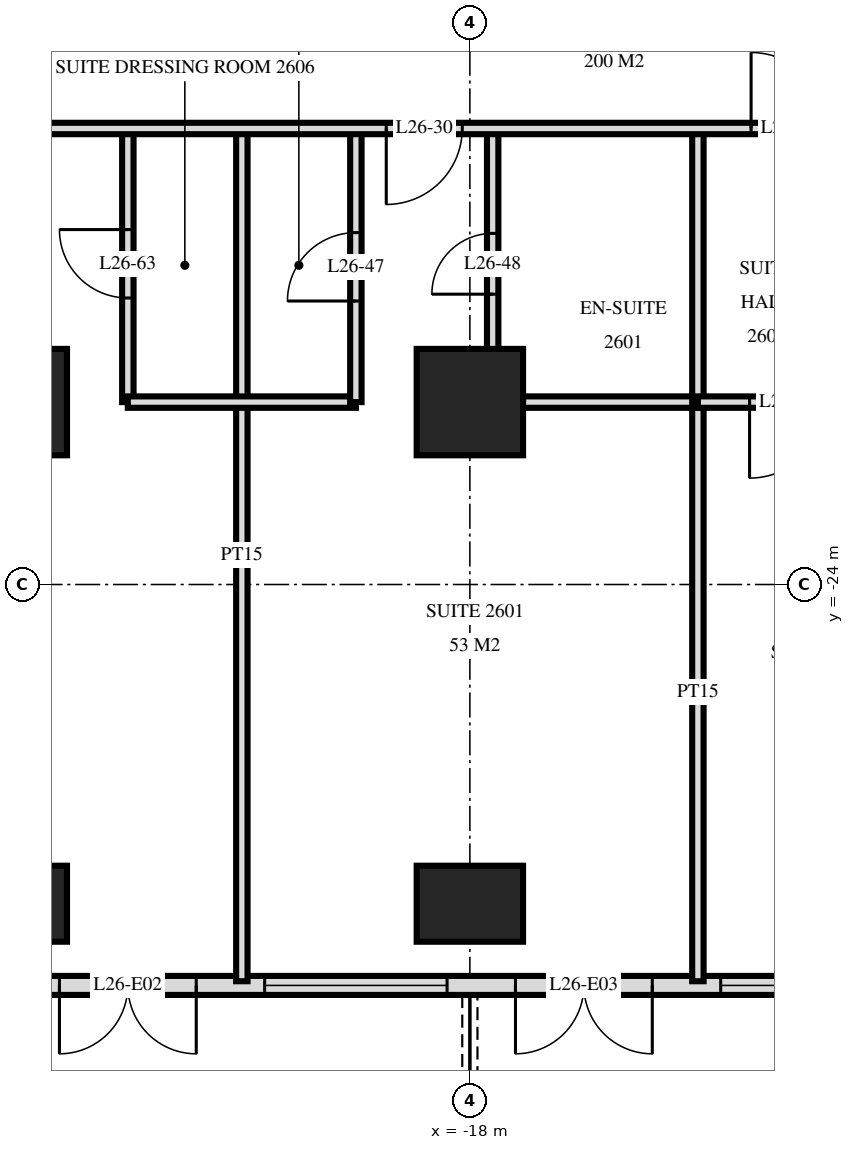
"""IFC4 building model, lengths in metres.
Left out: names, types, materials, properties, quantities, classifications, styles, units other than length and angle.
Written with IfcOpenShell. Run it as: python <this file> out.ifc"""

import sys

from ifc_helpers import new_model, si_unit, direction, frame, frame_2d, origin, origin_2d, place, context, subcontext, project, spatial, rectangle, extrude, element, fill, save


model = new_model("IFC4")
c1 = context("Model", 3, precision=1e-05, world=origin(), true_north=direction((0.0, 1.0)))
c2 = subcontext(c1, "Body", "Model", "MODEL_VIEW")
j1 = project(units=[si_unit("LENGTHUNIT", "METRE"), si_unit("PLANEANGLEUNIT", "RADIAN")], contexts=[c1])
p1 = place(None, origin())
s1 = spatial("IfcSite", under=j1, at=p1, CompositionType="ELEMENT")
p2 = place(p1, origin())
s2 = spatial("IfcBuilding", under=s1, at=p2, CompositionType="ELEMENT")
p3 = place(p2, frame((0.0, 0.0, 103.2)))
s3 = spatial("IfcBuildingStorey", under=s2, at=p3, CompositionType="ELEMENT", Elevation=103.2)
p4 = place(p3, frame((-24.0, -28.2, 0.0), z_axis=(0.0, 0.0, 1.0), x_axis=(1.0, 0.0, 0.0)))
e1 = element("IfcColumn", 1, at=p4, inside=s3, PredefinedType="COLUMN", context=c2, shape_type="SweptSolid", body=[
    extrude(rectangle(XDim=1.4, YDim=1.0, at=origin_2d()), origin(), (0.0, 0.0, 1.0), 3.6),
])
p5 = place(p3, frame((-24.0, -21.6, 0.0), z_axis=(0.0, 0.0, 1.0), x_axis=(1.0, 0.0, 0.0)))
e2 = element("IfcColumn", 2, at=p5, inside=s3, PredefinedType="COLUMN", context=c2, shape_type="SweptSolid", body=[
    extrude(rectangle(XDim=1.4, YDim=1.4, at=origin_2d()), origin(), (0.0, 0.0, 1.0), 3.6),
])
p6 = place(p3, frame((-18.0, -28.2, 0.0), z_axis=(0.0, 0.0, 1.0), x_axis=(1.0, 0.0, 0.0)))
e3 = element("IfcColumn", 3, at=p6, inside=s3, PredefinedType="COLUMN", context=c2, shape_type="SweptSolid", body=[
    extrude(rectangle(XDim=1.4, YDim=1.0, at=origin_2d()), origin(), (0.0, 0.0, 1.0), 3.6),
])
p7 = place(p3, frame((-18.0, -21.6, 0.0), z_axis=(0.0, 0.0, 1.0), x_axis=(1.0, 0.0, 0.0)))
e4 = element("IfcColumn", 4, at=p7, inside=s3, PredefinedType="COLUMN", context=c2, shape_type="SweptSolid", body=[
    extrude(rectangle(XDim=1.4, YDim=1.4, at=origin_2d()), origin(), (0.0, 0.0, 1.0), 3.6),
])
p8 = place(p3, frame((-28.775, -29.275, 0.0), z_axis=(0.0, 0.0, 1.0), x_axis=(1.0, 0.0, 0.0)))
e5 = element("IfcWall", 5, at=p8, inside=s3, PredefinedType="SOLIDWALL", context=c2, shape_type="SweptSolid", body=[
    extrude(rectangle(XDim=57.551, YDim=0.25, at=frame_2d((28.775, 0.0))), origin(), (0.0, 0.0, 1.0), 3.3),
])
p9 = place(p8, frame((0.575, 0.0, 0.0)))
e6 = element("IfcOpeningElement", 6, at=p9, cuts=e5, PredefinedType="OPENING", context=c2, shape_type="SweptSolid", body=[
    extrude(rectangle(XDim=1.8, YDim=2.4, at=frame_2d((0.9, 1.2))), frame((0.0, 0.135, 0.0), z_axis=(0.0, -1.0, 0.0), x_axis=(1.0, 0.0, 0.0)), (0.0, 0.0, 1.0), 0.27),
])
p10 = place(p8, frame((5.375, 0.0, 0.0)))
e7 = element("IfcOpeningElement", 7, at=p10, cuts=e5, PredefinedType="OPENING", context=c2, shape_type="SweptSolid", body=[
    extrude(rectangle(XDim=1.8, YDim=2.4, at=frame_2d((0.9, 1.2))), frame((0.0, 0.135, 0.0), z_axis=(0.0, -1.0, 0.0), x_axis=(1.0, 0.0, 0.0)), (0.0, 0.0, 1.0), 0.27),
])
p11 = place(p8, frame((8.075, 0.0, 0.3)))
e8 = element("IfcOpeningElement", 8, at=p11, cuts=e5, PredefinedType="OPENING", context=c2, shape_type="SweptSolid", body=[
    extrude(rectangle(XDim=2.4, YDim=2.1, at=frame_2d((1.2, 1.05))), frame((0.0, 0.135, 0.0), z_axis=(0.0, -1.0, 0.0), x_axis=(1.0, 0.0, 0.0)), (0.0, 0.0, 1.0), 0.27),
])
p12 = place(p8, frame((11.375, 0.0, 0.0)))
e9 = element("IfcOpeningElement", 9, at=p12, cuts=e5, PredefinedType="OPENING", context=c2, shape_type="SweptSolid", body=[
    extrude(rectangle(XDim=1.8, YDim=2.4, at=frame_2d((0.9, 1.2))), frame((0.0, 0.135, 0.0), z_axis=(0.0, -1.0, 0.0), x_axis=(1.0, 0.0, 0.0)), (0.0, 0.0, 1.0), 0.27),
])
p13 = place(p8, frame((14.075, 0.0, 0.3)))
e10 = element("IfcOpeningElement", 10, at=p13, cuts=e5, PredefinedType="OPENING", context=c2, shape_type="SweptSolid", body=[
    extrude(rectangle(XDim=2.4, YDim=2.1, at=frame_2d((1.2, 1.05))), frame((0.0, 0.135, 0.0), z_axis=(0.0, -1.0, 0.0), x_axis=(1.0, 0.0, 0.0)), (0.0, 0.0, 1.0), 0.27),
])
p14 = place(p8, frame((17.375, 0.0, 0.0)))
e11 = element("IfcOpeningElement", 11, at=p14, cuts=e5, PredefinedType="OPENING", context=c2, shape_type="SweptSolid", body=[
    extrude(rectangle(XDim=1.8, YDim=2.4, at=frame_2d((0.9, 1.2))), frame((0.0, 0.135, 0.0), z_axis=(0.0, -1.0, 0.0), x_axis=(1.0, 0.0, 0.0)), (0.0, 0.0, 1.0), 0.27),
])
p15 = place(p8, frame((20.075, 0.0, 0.3)))
e12 = element("IfcOpeningElement", 12, at=p15, cuts=e5, PredefinedType="OPENING", context=c2, shape_type="SweptSolid", body=[
    extrude(rectangle(XDim=2.4, YDim=2.1, at=frame_2d((1.2, 1.05))), frame((0.0, 0.135, 0.0), z_axis=(0.0, -1.0, 0.0), x_axis=(1.0, 0.0, 0.0)), (0.0, 0.0, 1.0), 0.27),
])
p16 = place(p8, frame((23.075, 0.0, 0.3)))
e13 = element("IfcOpeningElement", 13, at=p16, cuts=e5, PredefinedType="OPENING", context=c2, shape_type="SweptSolid", body=[
    extrude(rectangle(XDim=2.4, YDim=2.1, at=frame_2d((1.2, 1.05))), frame((0.0, 0.135, 0.0), z_axis=(0.0, -1.0, 0.0), x_axis=(1.0, 0.0, 0.0)), (0.0, 0.0, 1.0), 0.27),
])
p17 = place(p8, frame((26.375, 0.0, 0.0)))
e14 = element("IfcOpeningElement", 14, at=p17, cuts=e5, PredefinedType="OPENING", context=c2, shape_type="SweptSolid", body=[
    extrude(rectangle(XDim=1.8, YDim=2.4, at=frame_2d((0.9, 1.2))), frame((0.0, 0.135, 0.0), z_axis=(0.0, -1.0, 0.0), x_axis=(1.0, 0.0, 0.0)), (0.0, 0.0, 1.0), 0.27),
])
p18 = place(p8, frame((29.075, 0.0, 0.3)))
e15 = element("IfcOpeningElement", 15, at=p18, cuts=e5, PredefinedType="OPENING", context=c2, shape_type="SweptSolid", body=[
    extrude(rectangle(XDim=2.4, YDim=2.1, at=frame_2d((1.2, 1.05))), frame((0.0, 0.135, 0.0), z_axis=(0.0, -1.0, 0.0), x_axis=(1.0, 0.0, 0.0)), (0.0, 0.0, 1.0), 0.27),
])
p19 = place(p8, frame((32.375, 0.0, 0.0)))
e16 = element("IfcOpeningElement", 16, at=p19, cuts=e5, PredefinedType="OPENING", context=c2, shape_type="SweptSolid", body=[
    extrude(rectangle(XDim=1.8, YDim=2.4, at=frame_2d((0.9, 1.2))), frame((0.0, 0.135, 0.0), z_axis=(0.0, -1.0, 0.0), x_axis=(1.0, 0.0, 0.0)), (0.0, 0.0, 1.0), 0.27),
])
p20 = place(p8, frame((35.375, 0.0, 0.0)))
e17 = element("IfcOpeningElement", 17, at=p20, cuts=e5, PredefinedType="OPENING", context=c2, shape_type="SweptSolid", body=[
    extrude(rectangle(XDim=1.8, YDim=2.4, at=frame_2d((0.9, 1.2))), frame((0.0, 0.135, 0.0), z_axis=(0.0, -1.0, 0.0), x_axis=(1.0, 0.0, 0.0)), (0.0, 0.0, 1.0), 0.27),
])
p21 = place(p8, frame((38.075, 0.0, 0.3)))
e18 = element("IfcOpeningElement", 18, at=p21, cuts=e5, PredefinedType="OPENING", context=c2, shape_type="SweptSolid", body=[
    extrude(rectangle(XDim=2.4, YDim=2.1, at=frame_2d((1.2, 1.05))), frame((0.0, 0.135, 0.0), z_axis=(0.0, -1.0, 0.0), x_axis=(1.0, 0.0, 0.0)), (0.0, 0.0, 1.0), 0.27),
])
p22 = place(p8, frame((41.375, 0.0, 0.0)))
e19 = element("IfcOpeningElement", 19, at=p22, cuts=e5, PredefinedType="OPENING", context=c2, shape_type="SweptSolid", body=[
    extrude(rectangle(XDim=1.8, YDim=2.4, at=frame_2d((0.9, 1.2))), frame((0.0, 0.135, 0.0), z_axis=(0.0, -1.0, 0.0), x_axis=(1.0, 0.0, 0.0)), (0.0, 0.0, 1.0), 0.27),
])
p23 = place(p8, frame((44.075, 0.0, 0.3)))
e20 = element("IfcOpeningElement", 20, at=p23, cuts=e5, PredefinedType="OPENING", context=c2, shape_type="SweptSolid", body=[
    extrude(rectangle(XDim=2.4, YDim=2.1, at=frame_2d((1.2, 1.05))), frame((0.0, 0.135, 0.0), z_axis=(0.0, -1.0, 0.0), x_axis=(1.0, 0.0, 0.0)), (0.0, 0.0, 1.0), 0.27),
])
p24 = place(p8, frame((47.075, 0.0, 0.3)))
e21 = element("IfcOpeningElement", 21, at=p24, cuts=e5, PredefinedType="OPENING", context=c2, shape_type="SweptSolid", body=[
    extrude(rectangle(XDim=2.4, YDim=2.1, at=frame_2d((1.2, 1.05))), frame((0.0, 0.135, 0.0), z_axis=(0.0, -1.0, 0.0), x_axis=(1.0, 0.0, 0.0)), (0.0, 0.0, 1.0), 0.27),
])
p25 = place(p8, frame((50.375, 0.0, 0.0)))
e22 = element("IfcOpeningElement", 22, at=p25, cuts=e5, PredefinedType="OPENING", context=c2, shape_type="SweptSolid", body=[
    extrude(rectangle(XDim=1.8, YDim=2.4, at=frame_2d((0.9, 1.2))), frame((0.0, 0.135, 0.0), z_axis=(0.0, -1.0, 0.0), x_axis=(1.0, 0.0, 0.0)), (0.0, 0.0, 1.0), 0.27),
])
p26 = place(p8, frame((53.375, 0.0, 0.0)))
e23 = element("IfcOpeningElement", 23, at=p26, cuts=e5, PredefinedType="OPENING", context=c2, shape_type="SweptSolid", body=[
    extrude(rectangle(XDim=1.8, YDim=2.4, at=frame_2d((0.9, 1.2))), frame((0.0, 0.135, 0.0), z_axis=(0.0, -1.0, 0.0), x_axis=(1.0, 0.0, 0.0)), (0.0, 0.0, 1.0), 0.27),
])
p27 = place(p3, frame((-15.0, -21.6, 0.0), z_axis=(0.0, 0.0, 1.0), x_axis=(0.0, 1.0, 0.0)))
e24 = element("IfcWall", 24, at=p27, inside=s3, PredefinedType="PARTITIONING", context=c2, shape_type="SweptSolid", body=[
    extrude(rectangle(XDim=3.6, YDim=0.15, at=frame_2d((1.8, 0.0))), origin(), (0.0, 0.0, 1.0), 3.32),
])
p28 = place(p3, frame((-15.0, -29.22, 0.0), z_axis=(0.0, 0.0, 1.0), x_axis=(0.0, 1.0, 0.0)))
e25 = element("IfcWall", 25, at=p28, inside=s3, PredefinedType="PARTITIONING", context=c2, shape_type="SweptSolid", body=[
    extrude(rectangle(XDim=7.62, YDim=0.15, at=frame_2d((3.81, 0.0))), origin(), (0.0, 0.0, 1.0), 3.32),
])
p29 = place(p3, frame((-17.7, -21.6, 0.0), z_axis=(0.0, 0.0, 1.0), x_axis=(0.0, 1.0, 0.0)))
e26 = element("IfcWall", 26, at=p29, inside=s3, PredefinedType="PARTITIONING", context=c2, shape_type="SweptSolid", body=[
    extrude(rectangle(XDim=3.6, YDim=0.15, at=frame_2d((1.8, 0.0))), origin(), (0.0, 0.0, 1.0), 3.32),
])
p30 = place(p29, frame((1.42, 0.0, 0.0)))
e27 = element("IfcOpeningElement", 27, at=p30, cuts=e26, PredefinedType="OPENING", context=c2, shape_type="SweptSolid", body=[
    extrude(rectangle(XDim=0.8, YDim=2.1, at=frame_2d((0.4, 1.05))), frame((0.0, 0.085, 0.0), z_axis=(0.0, -1.0, 0.0), x_axis=(1.0, 0.0, 0.0)), (0.0, 0.0, 1.0), 0.17),
])
p31 = place(p3, frame((-19.5, -21.6, 0.0), z_axis=(0.0, 0.0, 1.0), x_axis=(0.0, 1.0, 0.0)))
e28 = element("IfcWall", 28, at=p31, inside=s3, PredefinedType="PARTITIONING", context=c2, shape_type="SweptSolid", body=[
    extrude(rectangle(XDim=3.6, YDim=0.15, at=frame_2d((1.8, 0.0))), origin(), (0.0, 0.0, 1.0), 3.32),
])
p32 = place(p31, frame((1.33, 0.0, 0.0)))
e29 = element("IfcOpeningElement", 29, at=p32, cuts=e28, PredefinedType="OPENING", context=c2, shape_type="SweptSolid", body=[
    extrude(rectangle(XDim=0.9, YDim=2.1, at=frame_2d((0.45, 1.05))), frame((0.0, 0.085, 0.0), z_axis=(0.0, -1.0, 0.0), x_axis=(1.0, 0.0, 0.0)), (0.0, 0.0, 1.0), 0.17),
])
p33 = place(p3, frame((-21.0, -29.22, 0.0), z_axis=(0.0, 0.0, 1.0), x_axis=(0.0, 1.0, 0.0)))
e30 = element("IfcWall", 30, at=p33, inside=s3, PredefinedType="PARTITIONING", context=c2, shape_type="SweptSolid", body=[
    extrude(rectangle(XDim=11.22, YDim=0.15, at=frame_2d((5.61, 0.0))), origin(), (0.0, 0.0, 1.0), 3.32),
])
p34 = place(p3, frame((-22.5, -21.6, 0.0), z_axis=(0.0, 0.0, 1.0), x_axis=(0.0, 1.0, 0.0)))
e31 = element("IfcWall", 31, at=p34, inside=s3, PredefinedType="PARTITIONING", context=c2, shape_type="SweptSolid", body=[
    extrude(rectangle(XDim=3.6, YDim=0.15, at=frame_2d((1.8, 0.0))), origin(), (0.0, 0.0, 1.0), 3.32),
])
p35 = place(p34, frame((1.37, 0.0, 0.0)))
e32 = element("IfcOpeningElement", 32, at=p35, cuts=e31, PredefinedType="OPENING", context=c2, shape_type="SweptSolid", body=[
    extrude(rectangle(XDim=0.9, YDim=2.1, at=frame_2d((0.45, 1.05))), frame((0.0, 0.085, 0.0), z_axis=(0.0, -1.0, 0.0), x_axis=(1.0, 0.0, 0.0)), (0.0, 0.0, 1.0), 0.17),
])
p36 = place(p3, frame((-15.0, -21.6, 0.0), z_axis=(0.0, 0.0, 1.0), x_axis=(1.0, 0.0, 0.0)))
e33 = element("IfcWall", 33, at=p36, inside=s3, PredefinedType="PARTITIONING", context=c2, shape_type="SweptSolid", body=[
    extrude(rectangle(XDim=2.4, YDim=0.15, at=frame_2d((1.2, 0.0))), origin(), (0.0, 0.0, 1.0), 3.32),
])
p37 = place(p36, frame((0.68, 0.0, 0.0)))
e34 = element("IfcOpeningElement", 34, at=p37, cuts=e33, PredefinedType="OPENING", context=c2, shape_type="SweptSolid", body=[
    extrude(rectangle(XDim=1.0, YDim=2.1, at=frame_2d((0.5, 1.05))), frame((0.0, 0.085, 0.0), z_axis=(0.0, -1.0, 0.0), x_axis=(1.0, 0.0, 0.0)), (0.0, 0.0, 1.0), 0.17),
])
p38 = place(p3, frame((-22.5, -21.6, 0.0), z_axis=(0.0, 0.0, 1.0), x_axis=(1.0, 0.0, 0.0)))
e35 = element("IfcWall", 35, at=p38, inside=s3, PredefinedType="PARTITIONING", context=c2, shape_type="SweptSolid", body=[
    extrude(rectangle(XDim=3.0, YDim=0.15, at=frame_2d((1.5, 0.0))), origin(), (0.0, 0.0, 1.0), 3.32),
])
p39 = place(p3, frame((-17.7, -21.6, 0.0), z_axis=(0.0, 0.0, 1.0), x_axis=(1.0, 0.0, 0.0)))
e36 = element("IfcWall", 36, at=p39, inside=s3, PredefinedType="PARTITIONING", context=c2, shape_type="SweptSolid", body=[
    extrude(rectangle(XDim=2.7, YDim=0.15, at=frame_2d((1.35, 0.0))), origin(), (0.0, 0.0, 1.0), 3.32),
])
p40 = place(p3, frame((-33.12, -18.0, 0.0), z_axis=(0.0, 0.0, 1.0), x_axis=(1.0, 0.0, 0.0)))
e37 = element("IfcWall", 37, at=p40, inside=s3, PredefinedType="PARTITIONING", context=c2, shape_type="SweptSolid", body=[
    extrude(rectangle(XDim=66.24, YDim=0.15, at=frame_2d((33.12, 0.0))), origin(), (0.0, 0.0, 1.0), 3.32),
])
p41 = place(p40, frame((14.02, 0.0, 0.0)))
e38 = element("IfcOpeningElement", 38, at=p41, cuts=e37, PredefinedType="OPENING", context=c2, shape_type="SweptSolid", body=[
    extrude(rectangle(XDim=1.0, YDim=2.1, at=frame_2d((0.5, 1.05))), frame((0.0, 0.085, 0.0), z_axis=(0.0, -1.0, 0.0), x_axis=(1.0, 0.0, 0.0)), (0.0, 0.0, 1.0), 0.17),
])
p42 = place(p40, frame((18.82, 0.0, 0.0)))
e39 = element("IfcOpeningElement", 39, at=p42, cuts=e37, PredefinedType="OPENING", context=c2, shape_type="SweptSolid", body=[
    extrude(rectangle(XDim=1.0, YDim=2.1, at=frame_2d((0.5, 1.05))), frame((0.0, 0.085, 0.0), z_axis=(0.0, -1.0, 0.0), x_axis=(1.0, 0.0, 0.0)), (0.0, 0.0, 1.0), 0.17),
])
p43 = place(p40, frame((30.27, 0.0, 0.0)))
e40 = element("IfcOpeningElement", 40, at=p43, cuts=e37, PredefinedType="OPENING", context=c2, shape_type="SweptSolid", body=[
    extrude(rectangle(XDim=1.0, YDim=2.1, at=frame_2d((0.5, 1.05))), frame((0.0, 0.085, 0.0), z_axis=(0.0, -1.0, 0.0), x_axis=(1.0, 0.0, 0.0)), (0.0, 0.0, 1.0), 0.17),
])
p44 = place(p40, frame((33.82, 0.0, 0.0)))
e41 = element("IfcOpeningElement", 41, at=p44, cuts=e37, PredefinedType="OPENING", context=c2, shape_type="SweptSolid", body=[
    extrude(rectangle(XDim=1.0, YDim=2.1, at=frame_2d((0.5, 1.05))), frame((0.0, 0.085, 0.0), z_axis=(0.0, -1.0, 0.0), x_axis=(1.0, 0.0, 0.0)), (0.0, 0.0, 1.0), 0.17),
])
p45 = place(p40, frame((46.27, 0.0, 0.0)))
e42 = element("IfcOpeningElement", 42, at=p45, cuts=e37, PredefinedType="OPENING", context=c2, shape_type="SweptSolid", body=[
    extrude(rectangle(XDim=1.0, YDim=2.1, at=frame_2d((0.5, 1.05))), frame((0.0, 0.085, 0.0), z_axis=(0.0, -1.0, 0.0), x_axis=(1.0, 0.0, 0.0)), (0.0, 0.0, 1.0), 0.17),
])
p46 = place(p40, frame((6.07, 0.0, 0.0)))
e43 = element("IfcOpeningElement", 43, at=p46, cuts=e37, PredefinedType="OPENING", context=c2, shape_type="SweptSolid", body=[
    extrude(rectangle(XDim=1.0, YDim=2.1, at=frame_2d((0.5, 1.05))), frame((0.0, 0.085, 0.0), z_axis=(0.0, -1.0, 0.0), x_axis=(1.0, 0.0, 0.0)), (0.0, 0.0, 1.0), 0.17),
])
p47 = place(p40, frame((60.37, 0.0, 0.0)))
e44 = element("IfcOpeningElement", 44, at=p47, cuts=e37, PredefinedType="OPENING", context=c2, shape_type="SweptSolid", body=[
    extrude(rectangle(XDim=1.0, YDim=2.1, at=frame_2d((0.5, 1.05))), frame((0.0, 0.085, 0.0), z_axis=(0.0, -1.0, 0.0), x_axis=(1.0, 0.0, 0.0)), (0.0, 0.0, 1.0), 0.17),
])
p48 = place(p10, frame((0.9, 0.0, 0.0), z_axis=(0.0, 0.0, 1.0), x_axis=(-1.0, 0.0, 0.0)))
e45 = element("IfcDoor", 45, at=p48, inside=s3, OperationType="DOUBLE_DOOR_SINGLE_SWING", PredefinedType="DOOR", context=c2, shape_type="SweptSolid", body=[
    extrude(rectangle(XDim=1.8, YDim=2.4, at=frame_2d((0.0, 1.2))), frame((0.0, -0.025, 0.0), z_axis=(0.0, 1.0, 0.0), x_axis=(-1.0, 0.0, 0.0)), (0.0, 0.0, 1.0), 0.05),
])
fill(e7, e45)
p49 = place(p11, origin())
e46 = element("IfcWindow", 46, at=p49, inside=s3, PartitioningType="SINGLE_PANEL", PredefinedType="WINDOW", context=c2, shape_type="SweptSolid", body=[
    extrude(rectangle(XDim=2.4, YDim=2.1, at=frame_2d((1.2, 1.05))), frame((0.0, 0.03, 0.0), z_axis=(0.0, -1.0, 0.0), x_axis=(1.0, 0.0, 0.0)), (0.0, 0.0, 1.0), 0.06),
])
fill(e8, e46)
p50 = place(p12, frame((0.9, 0.0, 0.0), z_axis=(0.0, 0.0, 1.0), x_axis=(-1.0, 0.0, 0.0)))
e47 = element("IfcDoor", 47, at=p50, inside=s3, OperationType="DOUBLE_DOOR_SINGLE_SWING", PredefinedType="DOOR", context=c2, shape_type="SweptSolid", body=[
    extrude(rectangle(XDim=1.8, YDim=2.4, at=frame_2d((0.0, 1.2))), frame((0.0, -0.025, 0.0), z_axis=(0.0, 1.0, 0.0), x_axis=(-1.0, 0.0, 0.0)), (0.0, 0.0, 1.0), 0.05),
])
fill(e9, e47)
p51 = place(p13, origin())
e48 = element("IfcWindow", 48, at=p51, inside=s3, PartitioningType="SINGLE_PANEL", PredefinedType="WINDOW", context=c2, shape_type="SweptSolid", body=[
    extrude(rectangle(XDim=2.4, YDim=2.1, at=frame_2d((1.2, 1.05))), frame((0.0, 0.03, 0.0), z_axis=(0.0, -1.0, 0.0), x_axis=(1.0, 0.0, 0.0)), (0.0, 0.0, 1.0), 0.06),
])
fill(e10, e48)
p52 = place(p41, frame((0.5, 0.0, 0.0), z_axis=(0.0, 0.0, 1.0), x_axis=(-1.0, 0.0, 0.0)))
e49 = element("IfcDoor", 49, at=p52, inside=s3, OperationType="SINGLE_SWING_LEFT", PredefinedType="DOOR", context=c2, shape_type="SweptSolid", body=[
    extrude(rectangle(XDim=1.0, YDim=2.1, at=frame_2d((0.0, 1.05))), frame((0.0, -0.025, 0.0), z_axis=(0.0, 1.0, 0.0), x_axis=(-1.0, 0.0, 0.0)), (0.0, 0.0, 1.0), 0.05),
])
fill(e38, e49)
p53 = place(p42, origin())
e50 = element("IfcDoor", 50, at=p53, inside=s3, OperationType="SINGLE_SWING_RIGHT", PredefinedType="DOOR", context=c2, shape_type="SweptSolid", body=[
    extrude(rectangle(XDim=1.0, YDim=2.1, at=frame_2d((0.5, 1.05))), frame((0.0, 0.025, 0.0), z_axis=(0.0, -1.0, 0.0), x_axis=(1.0, 0.0, 0.0)), (0.0, 0.0, 1.0), 0.05),
])
fill(e39, e50)
p54 = place(p32, origin())
e51 = element("IfcDoor", 51, at=p54, inside=s3, OperationType="SINGLE_SWING_RIGHT", PredefinedType="DOOR", context=c2, shape_type="SweptSolid", body=[
    extrude(rectangle(XDim=0.9, YDim=2.1, at=frame_2d((0.45, 1.05))), frame((0.0, 0.025, 0.0), z_axis=(0.0, -1.0, 0.0), x_axis=(1.0, 0.0, 0.0)), (0.0, 0.0, 1.0), 0.05),
])
fill(e29, e51)
p55 = place(p30, origin())
e52 = element("IfcDoor", 52, at=p55, inside=s3, OperationType="SINGLE_SWING_RIGHT", PredefinedType="DOOR", context=c2, shape_type="SweptSolid", body=[
    extrude(rectangle(XDim=0.8, YDim=2.1, at=frame_2d((0.4, 1.05))), frame((0.0, 0.025, 0.0), z_axis=(0.0, -1.0, 0.0), x_axis=(1.0, 0.0, 0.0)), (0.0, 0.0, 1.0), 0.05),
])
fill(e27, e52)
p56 = place(p37, frame((0.5, 0.0, 0.0), z_axis=(0.0, 0.0, 1.0), x_axis=(-1.0, 0.0, 0.0)))
e53 = element("IfcDoor", 53, at=p56, inside=s3, OperationType="SINGLE_SWING_LEFT", PredefinedType="DOOR", context=c2, shape_type="SweptSolid", body=[
    extrude(rectangle(XDim=1.0, YDim=2.1, at=frame_2d((0.0, 1.05))), frame((0.0, -0.025, 0.0), z_axis=(0.0, 1.0, 0.0), x_axis=(-1.0, 0.0, 0.0)), (0.0, 0.0, 1.0), 0.05),
])
fill(e34, e53)
p57 = place(p35, origin())
e54 = element("IfcDoor", 54, at=p57, inside=s3, OperationType="SINGLE_SWING_LEFT", PredefinedType="DOOR", context=c2, shape_type="SweptSolid", body=[
    extrude(rectangle(XDim=0.9, YDim=2.1, at=frame_2d((0.45, 1.05))), frame((0.0, 0.025, 0.0), z_axis=(0.0, -1.0, 0.0), x_axis=(1.0, 0.0, 0.0)), (0.0, 0.0, 1.0), 0.05),
])
fill(e32, e54)
save(model, sys.argv[1])
